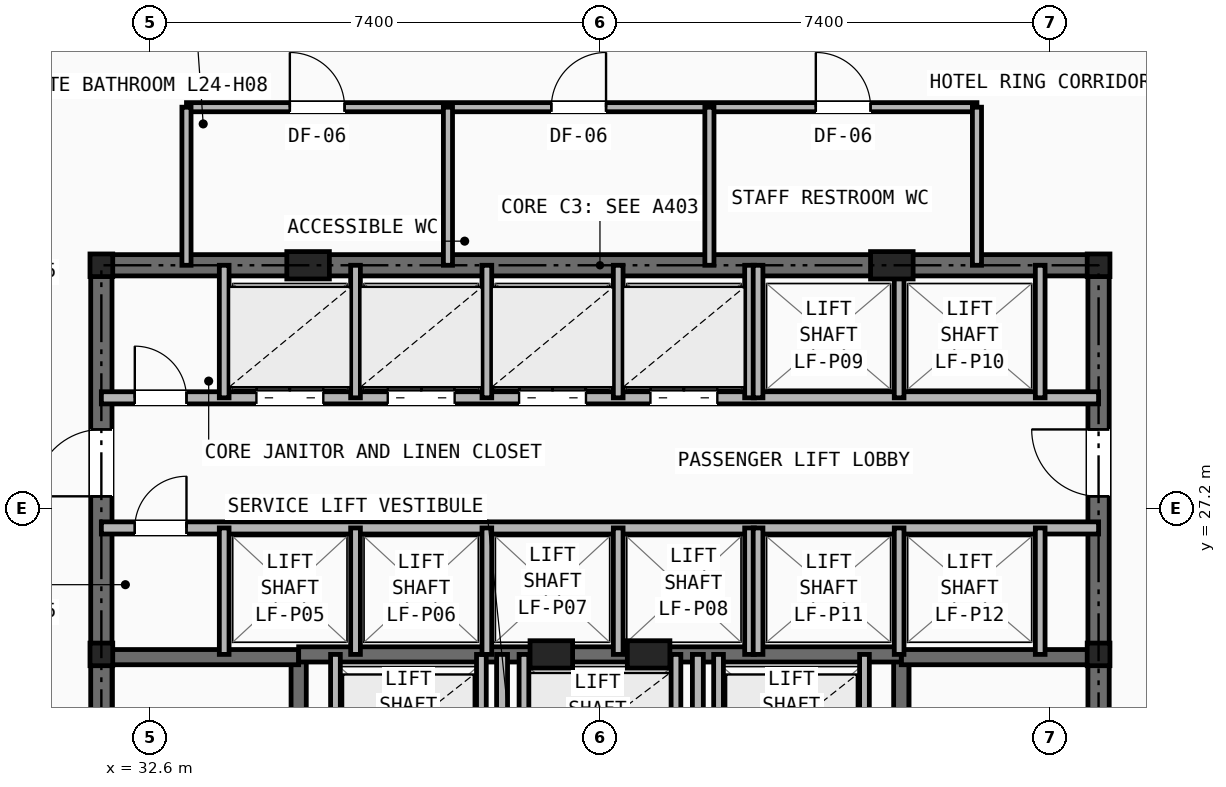
"""IFC4 building model, lengths in metres.
Left out: names, types, materials, properties, quantities, classifications, styles, units other than length and angle.
Written with IfcOpenShell. Run it as: python <this file> out.ifc"""

import sys

from ifc_helpers import new_model, si_unit, direction, frame, frame_2d, origin, origin_2d, place, context, subcontext, project, spatial, rectangle, i_section, extrude, element, fill, save


model = new_model("IFC4")
c1 = context("Model", 3, precision=1e-05, world=origin(), true_north=direction((0.0, 1.0)))
c2 = subcontext(c1, "Body", "Model", "MODEL_VIEW")
j1 = project(units=[si_unit("LENGTHUNIT", "METRE"), si_unit("PLANEANGLEUNIT", "RADIAN")], contexts=[c1])
p1 = place(None, origin())
s1 = spatial("IfcSite", under=j1, at=p1, CompositionType="ELEMENT")
p2 = place(p1, origin())
s2 = spatial("IfcBuilding", under=s1, at=p2, CompositionType="ELEMENT")
p3 = place(p2, frame((0.0, 0.0, 86.2)))
s3 = spatial("IfcBuildingStorey", under=s2, at=p3, CompositionType="ELEMENT", Elevation=86.2)
for number, where, z_axis, x_axis in (
    (1, (31.8, 24.8, 0.0), (0.0, 0.0, 1.0), (1.0, 0.0, 0.0)),
    (2, (48.2, 24.8, 0.0), (0.0, 0.0, 1.0), (1.0, 0.0, 0.0)),
    (3, (31.8, 31.2, 0.0), (0.0, 0.0, 1.0), (1.0, 0.0, 0.0)),
    (4, (48.2, 31.2, 0.0), (0.0, 0.0, 1.0), (1.0, 0.0, 0.0)),
):
    element("IfcColumn", number, at=place(p3, frame(where, z_axis=z_axis, x_axis=x_axis)), inside=s3, PredefinedType="COLUMN", context=c2, shape_type="SweptSolid", body=[
        extrude(i_section(OverallWidth=0.374, OverallDepth=0.372, WebThickness=0.016, FlangeThickness=0.026, at=origin_2d()), origin(), (0.0, 0.0, 1.0), 3.2),
    ])
for number, where, z_axis, x_axis in (
    (5, (35.2, 31.2, 0.0), (0.0, 0.0, 1.0), (1.0, 0.0, 0.0)),
    (6, (44.8, 31.2, 0.0), (0.0, 0.0, 1.0), (1.0, 0.0, 0.0)),
    (7, (39.2, 24.8, 0.0), (0.0, 0.0, 1.0), (1.0, 0.0, 0.0)),
    (8, (40.8, 24.8, 0.0), (0.0, 0.0, 1.0), (1.0, 0.0, 0.0)),
):
    element("IfcColumn", number, at=place(p3, frame(where, z_axis=z_axis, x_axis=x_axis)), inside=s3, PredefinedType="PILASTER", context=c2, shape_type="SweptSolid", body=[
        extrude(rectangle(XDim=0.7, YDim=0.45, at=origin_2d()), origin(), (0.0, 0.0, 1.0), 3.2),
    ])
p4 = place(p3, frame((31.8, 31.2, 0.0), z_axis=(0.0, 0.0, 1.0), x_axis=(1.0, 0.0, 0.0)))
e9 = element("IfcWall", 9, at=p4, inside=s3, PredefinedType="SHEAR", context=c2, shape_type="SweptSolid", body=[
    extrude(rectangle(XDim=16.4, YDim=0.35, at=frame_2d((8.2, 0.0))), origin(), (0.0, 0.0, 1.0), 2.97),
])
p5 = place(p3, frame((31.8, 16.4, 0.0), z_axis=(0.0, 0.0, 1.0), x_axis=(0.0, 1.0, 0.0)))
e10 = element("IfcWall", 10, at=p5, inside=s3, PredefinedType="SHEAR", context=c2, shape_type="SweptSolid", body=[
    extrude(rectangle(XDim=14.8, YDim=0.35, at=frame_2d((7.4, 0.0))), origin(), (0.0, 0.0, 1.0), 2.97),
])
p6 = place(p5, frame((11.0, 0.0, 0.0)))
e11 = element("IfcOpeningElement", 11, at=p6, cuts=e10, PredefinedType="OPENING", context=c2, shape_type="SweptSolid", body=[
    extrude(rectangle(XDim=1.1, YDim=2.15, at=frame_2d((0.55, 1.075))), frame((0.0, 0.185, 0.0), z_axis=(0.0, -1.0, 0.0), x_axis=(1.0, 0.0, 0.0)), (0.0, 0.0, 1.0), 0.37),
])
p7 = place(p3, frame((48.2, 16.4, 0.0), z_axis=(0.0, 0.0, 1.0), x_axis=(0.0, 1.0, 0.0)))
e12 = element("IfcWall", 12, at=p7, inside=s3, PredefinedType="SHEAR", context=c2, shape_type="SweptSolid", body=[
    extrude(rectangle(XDim=14.8, YDim=0.35, at=frame_2d((7.4, 0.0))), origin(), (0.0, 0.0, 1.0), 2.97),
])
p8 = place(p7, frame((11.0, 0.0, 0.0)))
e13 = element("IfcOpeningElement", 13, at=p8, cuts=e12, PredefinedType="OPENING", context=c2, shape_type="SweptSolid", body=[
    extrude(rectangle(XDim=1.1, YDim=2.15, at=frame_2d((0.55, 1.075))), frame((0.0, 0.185, 0.0), z_axis=(0.0, -1.0, 0.0), x_axis=(1.0, 0.0, 0.0)), (0.0, 0.0, 1.0), 0.37),
])
p9 = place(p3, frame((35.045, 16.4, 0.0), z_axis=(0.0, 0.0, 1.0), x_axis=(0.0, 1.0, 0.0)))
e14 = element("IfcWall", 14, at=p9, inside=s3, PredefinedType="SHEAR", context=c2, shape_type="SweptSolid", body=[
    extrude(rectangle(XDim=8.4, YDim=0.25, at=frame_2d((4.2, 0.0))), origin(), (0.0, 0.0, 1.0), 2.97),
])
p10 = place(p9, frame((0.45, 0.0, 0.0)))
e15 = element("IfcOpeningElement", 15, at=p10, cuts=e14, PredefinedType="OPENING", context=c2, shape_type="SweptSolid", body=[
    extrude(rectangle(XDim=0.95, YDim=2.1, at=frame_2d((0.475, 1.05))), frame((0.0, 0.135, 0.0), z_axis=(0.0, -1.0, 0.0), x_axis=(1.0, 0.0, 0.0)), (0.0, 0.0, 1.0), 0.27),
])
p11 = place(p3, frame((31.8, 24.755, 0.0), z_axis=(0.0, 0.0, 1.0), x_axis=(1.0, 0.0, 0.0)))
e16 = element("IfcWall", 16, at=p11, inside=s3, PredefinedType="SHEAR", context=c2, shape_type="SweptSolid", body=[
    extrude(rectangle(XDim=3.245, YDim=0.25, at=frame_2d((1.623, 0.0))), origin(), (0.0, 0.0, 1.0), 2.97),
])
p12 = place(p3, frame((44.955, 16.4, 0.0), z_axis=(0.0, 0.0, 1.0), x_axis=(0.0, 1.0, 0.0)))
e17 = element("IfcWall", 17, at=p12, inside=s3, PredefinedType="SHEAR", context=c2, shape_type="SweptSolid", body=[
    extrude(rectangle(XDim=8.4, YDim=0.25, at=frame_2d((4.2, 0.0))), origin(), (0.0, 0.0, 1.0), 2.97),
])
p13 = place(p12, frame((0.45, 0.0, 0.0)))
e18 = element("IfcOpeningElement", 18, at=p13, cuts=e17, PredefinedType="OPENING", context=c2, shape_type="SweptSolid", body=[
    extrude(rectangle(XDim=0.95, YDim=2.1, at=frame_2d((0.475, 1.05))), frame((0.0, 0.135, 0.0), z_axis=(0.0, -1.0, 0.0), x_axis=(1.0, 0.0, 0.0)), (0.0, 0.0, 1.0), 0.27),
])
p14 = place(p3, frame((44.955, 24.755, 0.0), z_axis=(0.0, 0.0, 1.0), x_axis=(1.0, 0.0, 0.0)))
e19 = element("IfcWall", 19, at=p14, inside=s3, PredefinedType="SHEAR", context=c2, shape_type="SweptSolid", body=[
    extrude(rectangle(XDim=3.245, YDim=0.25, at=frame_2d((1.623, 0.0))), origin(), (0.0, 0.0, 1.0), 2.97),
])
p15 = place(p3, frame((35.045, 24.8, 0.0), z_axis=(0.0, 0.0, 1.0), x_axis=(1.0, 0.0, 0.0)))
e20 = element("IfcWall", 20, at=p15, inside=s3, PredefinedType="SHEAR", context=c2, shape_type="SweptSolid", body=[
    extrude(rectangle(XDim=9.91, YDim=0.25, at=frame_2d((4.955, 0.0))), origin(), (0.0, 0.0, 1.0), 2.97),
])
p16 = place(p3, frame((38.39, 16.4, 0.0), z_axis=(0.0, 0.0, 1.0), x_axis=(0.0, 1.0, 0.0)))
e21 = element("IfcWall", 21, at=p16, inside=s3, PredefinedType="PARTITIONING", context=c2, shape_type="SweptSolid", body=[
    extrude(rectangle(XDim=8.4, YDim=0.18, at=frame_2d((4.2, 0.0))), origin(), (0.0, 0.0, 1.0), 2.421),
])
p17 = place(p16, frame((4.45, 0.0, 0.0)))
e22 = element("IfcOpeningElement", 22, at=p17, cuts=e21, PredefinedType="OPENING", context=c2, shape_type="SweptSolid", body=[
    extrude(rectangle(XDim=0.95, YDim=2.1, at=frame_2d((0.475, 1.05))), frame((0.0, 0.1, 0.0), z_axis=(0.0, -1.0, 0.0), x_axis=(1.0, 0.0, 0.0)), (0.0, 0.0, 1.0), 0.2),
])
p18 = place(p3, frame((41.61, 16.4, 0.0), z_axis=(0.0, 0.0, 1.0), x_axis=(0.0, 1.0, 0.0)))
e23 = element("IfcWall", 23, at=p18, inside=s3, PredefinedType="PARTITIONING", context=c2, shape_type="SweptSolid", body=[
    extrude(rectangle(XDim=8.4, YDim=0.18, at=frame_2d((4.2, 0.0))), origin(), (0.0, 0.0, 1.0), 2.421),
])
p19 = place(p18, frame((2.5, 0.0, 0.0)))
e24 = element("IfcOpeningElement", 24, at=p19, cuts=e23, PredefinedType="OPENING", context=c2, shape_type="SweptSolid", body=[
    extrude(rectangle(XDim=0.85, YDim=2.05, at=frame_2d((0.425, 1.025))), frame((0.0, 0.1, 0.0), z_axis=(0.0, -1.0, 0.0), x_axis=(1.0, 0.0, 0.0)), (0.0, 0.0, 1.0), 0.2),
])
for number, where, z_axis, x_axis in (
    (25, (35.65, 22.48, 0.0), (0.0, 0.0, 1.0), (0.0, 1.0, 0.0)),
    (26, (38.05, 22.48, 0.0), (0.0, 0.0, 1.0), (0.0, 1.0, 0.0)),
    (27, (41.95, 22.48, 0.0), (0.0, 0.0, 1.0), (0.0, 1.0, 0.0)),
    (28, (44.35, 22.48, 0.0), (0.0, 0.0, 1.0), (0.0, 1.0, 0.0)),
    (29, (38.75, 22.48, 0.0), (0.0, 0.0, 1.0), (0.0, 1.0, 0.0)),
    (30, (41.25, 22.48, 0.0), (0.0, 0.0, 1.0), (0.0, 1.0, 0.0)),
):
    element("IfcWall", number, at=place(p3, frame(where, z_axis=z_axis, x_axis=x_axis)), inside=s3, PredefinedType="SOLIDWALL", context=c2, shape_type="SweptSolid", body=[
        extrude(rectangle(XDim=2.32, YDim=0.16, at=frame_2d((1.16, 0.0))), origin(), (0.0, 0.0, 1.0), 2.97),
    ])
p20 = place(p3, frame((31.8, 29.02, 0.0), z_axis=(0.0, 0.0, 1.0), x_axis=(1.0, 0.0, 0.0)))
e31 = element("IfcWall", 31, at=p20, inside=s3, PredefinedType="SOLIDWALL", context=c2, shape_type="SweptSolid", body=[
    extrude(rectangle(XDim=16.4, YDim=0.2, at=frame_2d((8.2, 0.0))), origin(), (0.0, 0.0, 1.0), 2.421),
])
p21 = place(p20, frame((0.55, 0.0, 0.0)))
e32 = element("IfcOpeningElement", 32, at=p21, cuts=e31, PredefinedType="OPENING", context=c2, shape_type="SweptSolid", body=[
    extrude(rectangle(XDim=0.85, YDim=2.05, at=frame_2d((0.425, 1.025))), frame((0.0, 0.11, 0.0), z_axis=(0.0, -1.0, 0.0), x_axis=(1.0, 0.0, 0.0)), (0.0, 0.0, 1.0), 0.22),
])
p22 = place(p20, frame((2.55, 0.0, 0.0)))
e33 = element("IfcOpeningElement", 33, at=p22, cuts=e31, PredefinedType="OPENING", context=c2, shape_type="SweptSolid", body=[
    extrude(rectangle(XDim=1.1, YDim=2.15, at=frame_2d((0.55, 1.075))), frame((0.0, 0.11, 0.0), z_axis=(0.0, -1.0, 0.0), x_axis=(1.0, 0.0, 0.0)), (0.0, 0.0, 1.0), 0.22),
])
p23 = place(p20, frame((4.71, 0.0, 0.0)))
e34 = element("IfcOpeningElement", 34, at=p23, cuts=e31, PredefinedType="OPENING", context=c2, shape_type="SweptSolid", body=[
    extrude(rectangle(XDim=1.1, YDim=2.15, at=frame_2d((0.55, 1.075))), frame((0.0, 0.11, 0.0), z_axis=(0.0, -1.0, 0.0), x_axis=(1.0, 0.0, 0.0)), (0.0, 0.0, 1.0), 0.22),
])
p24 = place(p20, frame((6.87, 0.0, 0.0)))
e35 = element("IfcOpeningElement", 35, at=p24, cuts=e31, PredefinedType="OPENING", context=c2, shape_type="SweptSolid", body=[
    extrude(rectangle(XDim=1.1, YDim=2.15, at=frame_2d((0.55, 1.075))), frame((0.0, 0.11, 0.0), z_axis=(0.0, -1.0, 0.0), x_axis=(1.0, 0.0, 0.0)), (0.0, 0.0, 1.0), 0.22),
])
p25 = place(p20, frame((9.03, 0.0, 0.0)))
e36 = element("IfcOpeningElement", 36, at=p25, cuts=e31, PredefinedType="OPENING", context=c2, shape_type="SweptSolid", body=[
    extrude(rectangle(XDim=1.1, YDim=2.15, at=frame_2d((0.55, 1.075))), frame((0.0, 0.11, 0.0), z_axis=(0.0, -1.0, 0.0), x_axis=(1.0, 0.0, 0.0)), (0.0, 0.0, 1.0), 0.22),
])
p26 = place(p3, frame((31.8, 26.88, 0.0), z_axis=(0.0, 0.0, 1.0), x_axis=(1.0, 0.0, 0.0)))
e37 = element("IfcWall", 37, at=p26, inside=s3, PredefinedType="SOLIDWALL", context=c2, shape_type="SweptSolid", body=[
    extrude(rectangle(XDim=16.4, YDim=0.2, at=frame_2d((8.2, 0.0))), origin(), (0.0, 0.0, 1.0), 2.421),
])
p27 = place(p26, frame((0.55, 0.0, 0.0)))
e38 = element("IfcOpeningElement", 38, at=p27, cuts=e37, PredefinedType="OPENING", context=c2, shape_type="SweptSolid", body=[
    extrude(rectangle(XDim=0.85, YDim=2.05, at=frame_2d((0.425, 1.025))), frame((0.0, 0.11, 0.0), z_axis=(0.0, -1.0, 0.0), x_axis=(1.0, 0.0, 0.0)), (0.0, 0.0, 1.0), 0.22),
])
p28 = place(p3, frame((33.82, 29.02, 0.0), z_axis=(0.0, 0.0, 1.0), x_axis=(0.0, 1.0, 0.0)))
e39 = element("IfcWall", 39, at=p28, inside=s3, PredefinedType="SOLIDWALL", context=c2, shape_type="SweptSolid", body=[
    extrude(rectangle(XDim=2.18, YDim=0.16, at=frame_2d((1.09, 0.0))), origin(), (0.0, 0.0, 1.0), 2.421),
])
p29 = place(p3, frame((33.82, 24.8, 0.0), z_axis=(0.0, 0.0, 1.0), x_axis=(0.0, 1.0, 0.0)))
e40 = element("IfcWall", 40, at=p29, inside=s3, PredefinedType="SOLIDWALL", context=c2, shape_type="SweptSolid", body=[
    extrude(rectangle(XDim=2.08, YDim=0.16, at=frame_2d((1.04, 0.0))), origin(), (0.0, 0.0, 1.0), 2.97),
])
for number, where, z_axis, x_axis in (
    (41, (35.98, 29.02, 0.0), (0.0, 0.0, 1.0), (0.0, 1.0, 0.0)),
    (42, (38.14, 29.02, 0.0), (0.0, 0.0, 1.0), (0.0, 1.0, 0.0)),
    (43, (40.3, 29.02, 0.0), (0.0, 0.0, 1.0), (0.0, 1.0, 0.0)),
    (44, (42.46, 29.02, 0.0), (0.0, 0.0, 1.0), (0.0, 1.0, 0.0)),
):
    element("IfcWall", number, at=place(p3, frame(where, z_axis=z_axis, x_axis=x_axis)), inside=s3, PredefinedType="SOLIDWALL", context=c2, shape_type="SweptSolid", body=[
        extrude(rectangle(XDim=2.18, YDim=0.16, at=frame_2d((1.09, 0.0))), origin(), (0.0, 0.0, 1.0), 2.421),
    ])
for number, where, z_axis, x_axis in (
    (45, (35.98, 24.8, 0.0), (0.0, 0.0, 1.0), (0.0, 1.0, 0.0)),
    (46, (38.14, 24.8, 0.0), (0.0, 0.0, 1.0), (0.0, 1.0, 0.0)),
    (47, (40.3, 24.8, 0.0), (0.0, 0.0, 1.0), (0.0, 1.0, 0.0)),
    (48, (42.46, 24.8, 0.0), (0.0, 0.0, 1.0), (0.0, 1.0, 0.0)),
):
    element("IfcWall", number, at=place(p3, frame(where, z_axis=z_axis, x_axis=x_axis)), inside=s3, PredefinedType="SOLIDWALL", context=c2, shape_type="SweptSolid", body=[
        extrude(rectangle(XDim=2.08, YDim=0.16, at=frame_2d((1.04, 0.0))), origin(), (0.0, 0.0, 1.0), 2.97),
    ])
for number, where, z_axis, x_axis in (
    (49, (42.6, 29.02, 0.0), (0.0, 0.0, 1.0), (0.0, 1.0, 0.0)),
    (50, (44.92, 29.02, 0.0), (0.0, 0.0, 1.0), (0.0, 1.0, 0.0)),
    (51, (47.24, 29.02, 0.0), (0.0, 0.0, 1.0), (0.0, 1.0, 0.0)),
):
    element("IfcWall", number, at=place(p3, frame(where, z_axis=z_axis, x_axis=x_axis)), inside=s3, PredefinedType="SOLIDWALL", context=c2, shape_type="SweptSolid", body=[
        extrude(rectangle(XDim=2.18, YDim=0.16, at=frame_2d((1.09, 0.0))), origin(), (0.0, 0.0, 1.0), 2.421),
    ])
for number, where, z_axis, x_axis in (
    (52, (42.6, 24.8, 0.0), (0.0, 0.0, 1.0), (0.0, 1.0, 0.0)),
    (53, (44.92, 24.8, 0.0), (0.0, 0.0, 1.0), (0.0, 1.0, 0.0)),
    (54, (47.24, 24.8, 0.0), (0.0, 0.0, 1.0), (0.0, 1.0, 0.0)),
):
    element("IfcWall", number, at=place(p3, frame(where, z_axis=z_axis, x_axis=x_axis)), inside=s3, PredefinedType="SOLIDWALL", context=c2, shape_type="SweptSolid", body=[
        extrude(rectangle(XDim=2.08, YDim=0.16, at=frame_2d((1.04, 0.0))), origin(), (0.0, 0.0, 1.0), 2.97),
    ])
p30 = place(p3, frame((33.2, 33.8, 0.0), z_axis=(0.0, 0.0, 1.0), x_axis=(1.0, 0.0, 0.0)))
e55 = element("IfcWall", 55, at=p30, inside=s3, PredefinedType="PARTITIONING", context=c2, shape_type="SweptSolid", body=[
    extrude(rectangle(XDim=13.0, YDim=0.15, at=frame_2d((6.5, 0.0))), origin(), (0.0, 0.0, 1.0), 2.97),
])
p31 = place(p30, frame((1.7, 0.0, 0.0)))
e56 = element("IfcOpeningElement", 56, at=p31, cuts=e55, PredefinedType="OPENING", context=c2, shape_type="SweptSolid", body=[
    extrude(rectangle(XDim=0.9, YDim=2.1, at=frame_2d((0.45, 1.05))), frame((0.0, 0.085, 0.0), z_axis=(0.0, -1.0, 0.0), x_axis=(1.0, 0.0, 0.0)), (0.0, 0.0, 1.0), 0.17),
])
p32 = place(p30, frame((6.0, 0.0, 0.0)))
e57 = element("IfcOpeningElement", 57, at=p32, cuts=e55, PredefinedType="OPENING", context=c2, shape_type="SweptSolid", body=[
    extrude(rectangle(XDim=0.9, YDim=2.1, at=frame_2d((0.45, 1.05))), frame((0.0, 0.085, 0.0), z_axis=(0.0, -1.0, 0.0), x_axis=(1.0, 0.0, 0.0)), (0.0, 0.0, 1.0), 0.17),
])
p33 = place(p30, frame((10.35, 0.0, 0.0)))
e58 = element("IfcOpeningElement", 58, at=p33, cuts=e55, PredefinedType="OPENING", context=c2, shape_type="SweptSolid", body=[
    extrude(rectangle(XDim=0.9, YDim=2.1, at=frame_2d((0.45, 1.05))), frame((0.0, 0.085, 0.0), z_axis=(0.0, -1.0, 0.0), x_axis=(1.0, 0.0, 0.0)), (0.0, 0.0, 1.0), 0.17),
])
for number, where, z_axis, x_axis in (
    (59, (33.2, 31.2, 0.0), (0.0, 0.0, 1.0), (0.0, 1.0, 0.0)),
    (60, (46.2, 31.2, 0.0), (0.0, 0.0, 1.0), (0.0, 1.0, 0.0)),
    (61, (37.5, 31.2, 0.0), (0.0, 0.0, 1.0), (0.0, 1.0, 0.0)),
    (62, (41.8, 31.2, 0.0), (0.0, 0.0, 1.0), (0.0, 1.0, 0.0)),
):
    element("IfcWall", number, at=place(p3, frame(where, z_axis=z_axis, x_axis=x_axis)), inside=s3, PredefinedType="PARTITIONING", context=c2, shape_type="SweptSolid", body=[
        extrude(rectangle(XDim=2.6, YDim=0.15, at=frame_2d((1.3, 0.0))), origin(), (0.0, 0.0, 1.0), 2.421),
    ])
p34 = place(p21, origin())
e63 = element("IfcDoor", 63, at=p34, inside=s3, OperationType="SINGLE_SWING_LEFT", PredefinedType="DOOR", context=c2, shape_type="SweptSolid", body=[
    extrude(rectangle(XDim=0.85, YDim=2.05, at=frame_2d((0.425, 1.025))), frame((0.0, 0.025, 0.0), z_axis=(0.0, -1.0, 0.0), x_axis=(1.0, 0.0, 0.0)), (0.0, 0.0, 1.0), 0.05),
])
fill(e32, e63)
p35 = place(p27, origin())
e64 = element("IfcDoor", 64, at=p35, inside=s3, OperationType="SINGLE_SWING_RIGHT", PredefinedType="DOOR", context=c2, shape_type="SweptSolid", body=[
    extrude(rectangle(XDim=0.85, YDim=2.05, at=frame_2d((0.425, 1.025))), frame((0.0, 0.025, 0.0), z_axis=(0.0, -1.0, 0.0), x_axis=(1.0, 0.0, 0.0)), (0.0, 0.0, 1.0), 0.05),
])
fill(e38, e64)
p36 = place(p6, origin())
e65 = element("IfcDoor", 65, at=p36, inside=s3, OperationType="SINGLE_SWING_LEFT", PredefinedType="DOOR", context=c2, shape_type="SweptSolid", body=[
    extrude(rectangle(XDim=1.1, YDim=2.15, at=frame_2d((0.55, 1.075))), frame((0.0, 0.025, 0.0), z_axis=(0.0, -1.0, 0.0), x_axis=(1.0, 0.0, 0.0)), (0.0, 0.0, 1.0), 0.05),
])
fill(e11, e65)
p37 = place(p8, origin())
e66 = element("IfcDoor", 66, at=p37, inside=s3, OperationType="SINGLE_SWING_RIGHT", PredefinedType="DOOR", context=c2, shape_type="SweptSolid", body=[
    extrude(rectangle(XDim=1.1, YDim=2.15, at=frame_2d((0.55, 1.075))), frame((0.0, 0.025, 0.0), z_axis=(0.0, -1.0, 0.0), x_axis=(1.0, 0.0, 0.0)), (0.0, 0.0, 1.0), 0.05),
])
fill(e13, e66)
p38 = place(p22, origin())
e67 = element("IfcDoor", 67, at=p38, inside=s3, OperationType="DOUBLE_DOOR_SLIDING", PredefinedType="DOOR", context=c2, shape_type="SweptSolid", body=[
    extrude(rectangle(XDim=1.1, YDim=2.15, at=frame_2d((0.55, 1.075))), frame((0.0, 0.025, 0.0), z_axis=(0.0, -1.0, 0.0), x_axis=(1.0, 0.0, 0.0)), (0.0, 0.0, 1.0), 0.05),
])
fill(e33, e67)
p39 = place(p23, origin())
e68 = element("IfcDoor", 68, at=p39, inside=s3, OperationType="DOUBLE_DOOR_SLIDING", PredefinedType="DOOR", context=c2, shape_type="SweptSolid", body=[
    extrude(rectangle(XDim=1.1, YDim=2.15, at=frame_2d((0.55, 1.075))), frame((0.0, 0.025, 0.0), z_axis=(0.0, -1.0, 0.0), x_axis=(1.0, 0.0, 0.0)), (0.0, 0.0, 1.0), 0.05),
])
fill(e34, e68)
p40 = place(p24, origin())
e69 = element("IfcDoor", 69, at=p40, inside=s3, OperationType="DOUBLE_DOOR_SLIDING", PredefinedType="DOOR", context=c2, shape_type="SweptSolid", body=[
    extrude(rectangle(XDim=1.1, YDim=2.15, at=frame_2d((0.55, 1.075))), frame((0.0, 0.025, 0.0), z_axis=(0.0, -1.0, 0.0), x_axis=(1.0, 0.0, 0.0)), (0.0, 0.0, 1.0), 0.05),
])
fill(e35, e69)
p41 = place(p25, origin())
e70 = element("IfcDoor", 70, at=p41, inside=s3, OperationType="DOUBLE_DOOR_SLIDING", PredefinedType="DOOR", context=c2, shape_type="SweptSolid", body=[
    extrude(rectangle(XDim=1.1, YDim=2.15, at=frame_2d((0.55, 1.075))), frame((0.0, 0.025, 0.0), z_axis=(0.0, -1.0, 0.0), x_axis=(1.0, 0.0, 0.0)), (0.0, 0.0, 1.0), 0.05),
])
fill(e36, e70)
p42 = place(p31, origin())
e71 = element("IfcDoor", 71, at=p42, inside=s3, OperationType="SINGLE_SWING_LEFT", PredefinedType="DOOR", context=c2, shape_type="SweptSolid", body=[
    extrude(rectangle(XDim=0.9, YDim=2.1, at=frame_2d((0.45, 1.05))), frame((0.0, 0.025, 0.0), z_axis=(0.0, -1.0, 0.0), x_axis=(1.0, 0.0, 0.0)), (0.0, 0.0, 1.0), 0.05),
])
fill(e56, e71)
p43 = place(p32, origin())
e72 = element("IfcDoor", 72, at=p43, inside=s3, OperationType="SINGLE_SWING_RIGHT", PredefinedType="DOOR", context=c2, shape_type="SweptSolid", body=[
    extrude(rectangle(XDim=0.9, YDim=2.1, at=frame_2d((0.45, 1.05))), frame((0.0, 0.025, 0.0), z_axis=(0.0, -1.0, 0.0), x_axis=(1.0, 0.0, 0.0)), (0.0, 0.0, 1.0), 0.05),
])
fill(e57, e72)
p44 = place(p33, origin())
e73 = element("IfcDoor", 73, at=p44, inside=s3, OperationType="SINGLE_SWING_LEFT", PredefinedType="DOOR", context=c2, shape_type="SweptSolid", body=[
    extrude(rectangle(XDim=0.9, YDim=2.1, at=frame_2d((0.45, 1.05))), frame((0.0, 0.025, 0.0), z_axis=(0.0, -1.0, 0.0), x_axis=(1.0, 0.0, 0.0)), (0.0, 0.0, 1.0), 0.05),
])
fill(e58, e73)
save(model, sys.argv[1])
